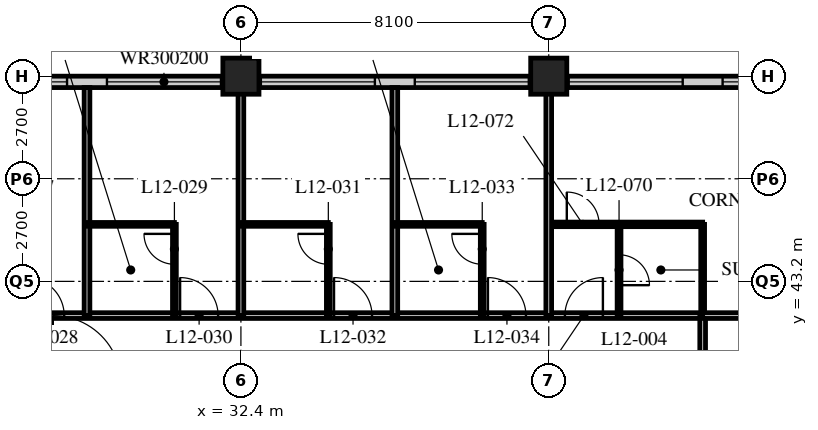
"""IFC4 building model, lengths in metres.
Left out: names, types, materials, properties, quantities, classifications, styles, units other than length and angle.
Written with IfcOpenShell. Run it as: python <this file> out.ifc"""

import sys

from ifc_helpers import new_model, si_unit, direction, frame, frame_2d, origin, origin_2d, place, context, subcontext, project, spatial, rectangle, hollow_rectangle, extrude, element, fill, save


model = new_model("IFC4")
c1 = context("Model", 3, precision=1e-05, world=origin(), true_north=direction((0.0, 1.0)))
c2 = subcontext(c1, "Body", "Model", "MODEL_VIEW")
j1 = project(units=[si_unit("LENGTHUNIT", "METRE"), si_unit("PLANEANGLEUNIT", "RADIAN")], contexts=[c1])
p1 = place(None, origin())
s1 = spatial("IfcSite", under=j1, at=p1, CompositionType="ELEMENT")
p2 = place(p1, origin())
s2 = spatial("IfcBuilding", under=s1, at=p2, CompositionType="ELEMENT")
p3 = place(p2, frame((0.0, 0.0, 53.4)))
s3 = spatial("IfcBuildingStorey", under=s2, at=p3, CompositionType="ELEMENT", Elevation=53.4)
for number, where, z_axis, x_axis in (
    (1, (32.4, 48.6, 0.0), (0.0, 0.0, 1.0), (1.0, 0.0, 0.0)),
    (2, (40.5, 48.6, 0.0), (0.0, 0.0, 1.0), (1.0, 0.0, 0.0)),
):
    element("IfcColumn", number, at=place(p3, frame(where, z_axis=z_axis, x_axis=x_axis)), inside=s3, PredefinedType="COLUMN", context=c2, shape_type="SweptSolid", body=[
        extrude(hollow_rectangle(XDim=0.95, YDim=0.95, WallThickness=0.095, at=origin_2d()), origin(), (0.0, 0.0, 1.0), 3.4),
    ])
p4 = place(p3, frame((48.3, 48.45, 0.0), z_axis=(0.0, 0.0, 1.0), x_axis=(-1.0, 0.0, 0.0)))
e3 = element("IfcWall", 3, at=p4, inside=s3, PredefinedType="SOLIDWALL", context=c2, shape_type="SweptSolid", body=[
    extrude(rectangle(XDim=40.2, YDim=0.3, at=frame_2d((20.1, 0.0))), origin(), (0.0, 0.0, 1.0), 3.19),
])
p5 = place(p4, frame((0.225, 0.0, 0.9)))
e4 = element("IfcOpeningElement", 4, at=p5, cuts=e3, PredefinedType="OPENING", context=c2, shape_type="SweptSolid", body=[
    extrude(rectangle(XDim=3.0, YDim=2.0, at=frame_2d((1.5, 1.0))), frame((0.0, 0.16, 0.0), z_axis=(0.0, -1.0, 0.0), x_axis=(1.0, 0.0, 0.0)), (0.0, 0.0, 1.0), 0.32),
])
p6 = place(p4, frame((4.275, 0.0, 0.9)))
e5 = element("IfcOpeningElement", 5, at=p6, cuts=e3, PredefinedType="OPENING", context=c2, shape_type="SweptSolid", body=[
    extrude(rectangle(XDim=3.0, YDim=2.0, at=frame_2d((1.5, 1.0))), frame((0.0, 0.16, 0.0), z_axis=(0.0, -1.0, 0.0), x_axis=(1.0, 0.0, 0.0)), (0.0, 0.0, 1.0), 0.32),
])
p7 = place(p4, frame((8.325, 0.0, 0.9)))
e6 = element("IfcOpeningElement", 6, at=p7, cuts=e3, PredefinedType="OPENING", context=c2, shape_type="SweptSolid", body=[
    extrude(rectangle(XDim=3.0, YDim=2.0, at=frame_2d((1.5, 1.0))), frame((0.0, 0.16, 0.0), z_axis=(0.0, -1.0, 0.0), x_axis=(1.0, 0.0, 0.0)), (0.0, 0.0, 1.0), 0.32),
])
p8 = place(p4, frame((12.375, 0.0, 0.9)))
e7 = element("IfcOpeningElement", 7, at=p8, cuts=e3, PredefinedType="OPENING", context=c2, shape_type="SweptSolid", body=[
    extrude(rectangle(XDim=3.0, YDim=2.0, at=frame_2d((1.5, 1.0))), frame((0.0, 0.16, 0.0), z_axis=(0.0, -1.0, 0.0), x_axis=(1.0, 0.0, 0.0)), (0.0, 0.0, 1.0), 0.32),
])
p9 = place(p4, frame((16.425, 0.0, 0.9)))
e8 = element("IfcOpeningElement", 8, at=p9, cuts=e3, PredefinedType="OPENING", context=c2, shape_type="SweptSolid", body=[
    extrude(rectangle(XDim=3.0, YDim=2.0, at=frame_2d((1.5, 1.0))), frame((0.0, 0.16, 0.0), z_axis=(0.0, -1.0, 0.0), x_axis=(1.0, 0.0, 0.0)), (0.0, 0.0, 1.0), 0.32),
])
p10 = place(p4, frame((20.475, 0.0, 0.9)))
e9 = element("IfcOpeningElement", 9, at=p10, cuts=e3, PredefinedType="OPENING", context=c2, shape_type="SweptSolid", body=[
    extrude(rectangle(XDim=3.0, YDim=2.0, at=frame_2d((1.5, 1.0))), frame((0.0, 0.16, 0.0), z_axis=(0.0, -1.0, 0.0), x_axis=(1.0, 0.0, 0.0)), (0.0, 0.0, 1.0), 0.32),
])
p11 = place(p4, frame((24.525, 0.0, 0.9)))
e10 = element("IfcOpeningElement", 10, at=p11, cuts=e3, PredefinedType="OPENING", context=c2, shape_type="SweptSolid", body=[
    extrude(rectangle(XDim=3.0, YDim=2.0, at=frame_2d((1.5, 1.0))), frame((0.0, 0.16, 0.0), z_axis=(0.0, -1.0, 0.0), x_axis=(1.0, 0.0, 0.0)), (0.0, 0.0, 1.0), 0.32),
])
p12 = place(p4, frame((28.575, 0.0, 0.9)))
e11 = element("IfcOpeningElement", 11, at=p12, cuts=e3, PredefinedType="OPENING", context=c2, shape_type="SweptSolid", body=[
    extrude(rectangle(XDim=3.0, YDim=2.0, at=frame_2d((1.5, 1.0))), frame((0.0, 0.16, 0.0), z_axis=(0.0, -1.0, 0.0), x_axis=(1.0, 0.0, 0.0)), (0.0, 0.0, 1.0), 0.32),
])
p13 = place(p4, frame((32.625, 0.0, 0.9)))
e12 = element("IfcOpeningElement", 12, at=p13, cuts=e3, PredefinedType="OPENING", context=c2, shape_type="SweptSolid", body=[
    extrude(rectangle(XDim=3.0, YDim=2.0, at=frame_2d((1.5, 1.0))), frame((0.0, 0.16, 0.0), z_axis=(0.0, -1.0, 0.0), x_axis=(1.0, 0.0, 0.0)), (0.0, 0.0, 1.0), 0.32),
])
p14 = place(p4, frame((36.675, 0.0, 0.9)))
e13 = element("IfcOpeningElement", 13, at=p14, cuts=e3, PredefinedType="OPENING", context=c2, shape_type="SweptSolid", body=[
    extrude(rectangle(XDim=3.0, YDim=2.0, at=frame_2d((1.5, 1.0))), frame((0.0, 0.16, 0.0), z_axis=(0.0, -1.0, 0.0), x_axis=(1.0, 0.0, 0.0)), (0.0, 0.0, 1.0), 0.32),
])
p15 = place(p3, frame((12.15, 42.3, 0.0), z_axis=(0.0, 0.0, 1.0), x_axis=(1.0, 0.0, 0.0)))
e14 = element("IfcWall", 14, at=p15, inside=s3, PredefinedType="PARTITIONING", context=c2, shape_type="SweptSolid", body=[
    extrude(rectangle(XDim=32.4, YDim=0.15, at=frame_2d((16.2, 0.0))), origin(), (0.0, 0.0, 1.0), 3.19),
])
p16 = place(p15, frame((6.5, 0.0, 0.0)))
e15 = element("IfcOpeningElement", 15, at=p16, cuts=e14, PredefinedType="OPENING", context=c2, shape_type="SweptSolid", body=[
    extrude(rectangle(XDim=1.0, YDim=2.1, at=frame_2d((0.5, 1.05))), frame((0.0, 0.085, 0.0), z_axis=(0.0, -1.0, 0.0), x_axis=(1.0, 0.0, 0.0)), (0.0, 0.0, 1.0), 0.17),
])
p17 = place(p15, frame((10.55, 0.0, 0.0)))
e16 = element("IfcOpeningElement", 16, at=p17, cuts=e14, PredefinedType="OPENING", context=c2, shape_type="SweptSolid", body=[
    extrude(rectangle(XDim=1.0, YDim=2.1, at=frame_2d((0.5, 1.05))), frame((0.0, 0.085, 0.0), z_axis=(0.0, -1.0, 0.0), x_axis=(1.0, 0.0, 0.0)), (0.0, 0.0, 1.0), 0.17),
])
p18 = place(p15, frame((14.6, 0.0, 0.0)))
e17 = element("IfcOpeningElement", 17, at=p18, cuts=e14, PredefinedType="OPENING", context=c2, shape_type="SweptSolid", body=[
    extrude(rectangle(XDim=1.0, YDim=2.1, at=frame_2d((0.5, 1.05))), frame((0.0, 0.085, 0.0), z_axis=(0.0, -1.0, 0.0), x_axis=(1.0, 0.0, 0.0)), (0.0, 0.0, 1.0), 0.17),
])
p19 = place(p15, frame((18.65, 0.0, 0.0)))
e18 = element("IfcOpeningElement", 18, at=p19, cuts=e14, PredefinedType="OPENING", context=c2, shape_type="SweptSolid", body=[
    extrude(rectangle(XDim=1.0, YDim=2.1, at=frame_2d((0.5, 1.05))), frame((0.0, 0.085, 0.0), z_axis=(0.0, -1.0, 0.0), x_axis=(1.0, 0.0, 0.0)), (0.0, 0.0, 1.0), 0.17),
])
p20 = place(p15, frame((22.7, 0.0, 0.0)))
e19 = element("IfcOpeningElement", 19, at=p20, cuts=e14, PredefinedType="OPENING", context=c2, shape_type="SweptSolid", body=[
    extrude(rectangle(XDim=1.0, YDim=2.1, at=frame_2d((0.5, 1.05))), frame((0.0, 0.085, 0.0), z_axis=(0.0, -1.0, 0.0), x_axis=(1.0, 0.0, 0.0)), (0.0, 0.0, 1.0), 0.17),
])
p21 = place(p15, frame((26.75, 0.0, 0.0)))
e20 = element("IfcOpeningElement", 20, at=p21, cuts=e14, PredefinedType="OPENING", context=c2, shape_type="SweptSolid", body=[
    extrude(rectangle(XDim=1.0, YDim=2.1, at=frame_2d((0.5, 1.05))), frame((0.0, 0.085, 0.0), z_axis=(0.0, -1.0, 0.0), x_axis=(1.0, 0.0, 0.0)), (0.0, 0.0, 1.0), 0.17),
])
p22 = place(p15, frame((28.775, 0.0, 0.0)))
e21 = element("IfcOpeningElement", 21, at=p22, cuts=e14, PredefinedType="OPENING", context=c2, shape_type="SweptSolid", body=[
    extrude(rectangle(XDim=1.0, YDim=2.1, at=frame_2d((0.5, 1.05))), frame((0.0, 0.085, 0.0), z_axis=(0.0, -1.0, 0.0), x_axis=(1.0, 0.0, 0.0)), (0.0, 0.0, 1.0), 0.17),
])
p23 = place(p15, frame((2.625, 0.0, 0.0)))
e22 = element("IfcOpeningElement", 22, at=p23, cuts=e14, PredefinedType="OPENING", context=c2, shape_type="SweptSolid", body=[
    extrude(rectangle(XDim=1.0, YDim=2.1, at=frame_2d((0.5, 1.05))), frame((0.0, 0.085, 0.0), z_axis=(0.0, -1.0, 0.0), x_axis=(1.0, 0.0, 0.0)), (0.0, 0.0, 1.0), 0.17),
])
p24 = place(p3, frame((44.55, 12.15, 0.0), z_axis=(0.0, 0.0, 1.0), x_axis=(0.0, 1.0, 0.0)))
e23 = element("IfcWall", 23, at=p24, inside=s3, PredefinedType="PARTITIONING", context=c2, shape_type="SweptSolid", body=[
    extrude(rectangle(XDim=30.15, YDim=0.15, at=frame_2d((15.075, 0.0))), origin(), (0.0, 0.0, 1.0), 3.19),
])
p25 = place(p24, frame((2.75, 0.0, 0.0)))
e24 = element("IfcOpeningElement", 24, at=p25, cuts=e23, PredefinedType="OPENING", context=c2, shape_type="SweptSolid", body=[
    extrude(rectangle(XDim=1.0, YDim=2.1, at=frame_2d((0.5, 1.05))), frame((0.0, 0.085, 0.0), z_axis=(0.0, -1.0, 0.0), x_axis=(1.0, 0.0, 0.0)), (0.0, 0.0, 1.0), 0.17),
])
p26 = place(p24, frame((6.5, 0.0, 0.0)))
e25 = element("IfcOpeningElement", 25, at=p26, cuts=e23, PredefinedType="OPENING", context=c2, shape_type="SweptSolid", body=[
    extrude(rectangle(XDim=1.0, YDim=2.1, at=frame_2d((0.5, 1.05))), frame((0.0, 0.085, 0.0), z_axis=(0.0, -1.0, 0.0), x_axis=(1.0, 0.0, 0.0)), (0.0, 0.0, 1.0), 0.17),
])
p27 = place(p24, frame((10.55, 0.0, 0.0)))
e26 = element("IfcOpeningElement", 26, at=p27, cuts=e23, PredefinedType="OPENING", context=c2, shape_type="SweptSolid", body=[
    extrude(rectangle(XDim=1.0, YDim=2.1, at=frame_2d((0.5, 1.05))), frame((0.0, 0.085, 0.0), z_axis=(0.0, -1.0, 0.0), x_axis=(1.0, 0.0, 0.0)), (0.0, 0.0, 1.0), 0.17),
])
p28 = place(p24, frame((14.6, 0.0, 0.0)))
e27 = element("IfcOpeningElement", 27, at=p28, cuts=e23, PredefinedType="OPENING", context=c2, shape_type="SweptSolid", body=[
    extrude(rectangle(XDim=1.0, YDim=2.1, at=frame_2d((0.5, 1.05))), frame((0.0, 0.085, 0.0), z_axis=(0.0, -1.0, 0.0), x_axis=(1.0, 0.0, 0.0)), (0.0, 0.0, 1.0), 0.17),
])
p29 = place(p24, frame((18.65, 0.0, 0.0)))
e28 = element("IfcOpeningElement", 28, at=p29, cuts=e23, PredefinedType="OPENING", context=c2, shape_type="SweptSolid", body=[
    extrude(rectangle(XDim=1.0, YDim=2.1, at=frame_2d((0.5, 1.05))), frame((0.0, 0.085, 0.0), z_axis=(0.0, -1.0, 0.0), x_axis=(1.0, 0.0, 0.0)), (0.0, 0.0, 1.0), 0.17),
])
p30 = place(p24, frame((22.7, 0.0, 0.0)))
e29 = element("IfcOpeningElement", 29, at=p30, cuts=e23, PredefinedType="OPENING", context=c2, shape_type="SweptSolid", body=[
    extrude(rectangle(XDim=1.0, YDim=2.1, at=frame_2d((0.5, 1.05))), frame((0.0, 0.085, 0.0), z_axis=(0.0, -1.0, 0.0), x_axis=(1.0, 0.0, 0.0)), (0.0, 0.0, 1.0), 0.17),
])
p31 = place(p24, frame((26.7, 0.0, 0.0)))
e30 = element("IfcOpeningElement", 30, at=p31, cuts=e23, PredefinedType="OPENING", context=c2, shape_type="SweptSolid", body=[
    extrude(rectangle(XDim=1.0, YDim=2.1, at=frame_2d((0.5, 1.05))), frame((0.0, 0.085, 0.0), z_axis=(0.0, -1.0, 0.0), x_axis=(1.0, 0.0, 0.0)), (0.0, 0.0, 1.0), 0.17),
])
p32 = place(p3, frame((28.35, 42.3, 0.0), z_axis=(0.0, 0.0, 1.0), x_axis=(0.0, 1.0, 0.0)))
e31 = element("IfcWall", 31, at=p32, inside=s3, PredefinedType="PARTITIONING", context=c2, shape_type="SweptSolid", body=[
    extrude(rectangle(XDim=6.0, YDim=0.15, at=frame_2d((3.0, 0.0))), origin(), (0.0, 0.0, 1.0), 3.19),
])
p33 = place(p3, frame((28.35, 44.7, 0.0), z_axis=(0.0, 0.0, 1.0), x_axis=(1.0, 0.0, 0.0)))
e32 = element("IfcWall", 32, at=p33, inside=s3, PredefinedType="PARTITIONING", context=c2, shape_type="SweptSolid", body=[
    extrude(rectangle(XDim=2.3, YDim=0.1, at=frame_2d((1.15, 0.0))), origin(), (0.0, 0.0, 1.0), 3.19),
])
p34 = place(p3, frame((30.65, 42.3, 0.0), z_axis=(0.0, 0.0, 1.0), x_axis=(0.0, 1.0, 0.0)))
e33 = element("IfcWall", 33, at=p34, inside=s3, PredefinedType="PARTITIONING", context=c2, shape_type="SweptSolid", body=[
    extrude(rectangle(XDim=2.4, YDim=0.1, at=frame_2d((1.2, 0.0))), origin(), (0.0, 0.0, 1.0), 3.19),
])
p35 = place(p34, frame((1.35, 0.0, 0.0)))
e34 = element("IfcOpeningElement", 34, at=p35, cuts=e33, PredefinedType="OPENING", context=c2, shape_type="SweptSolid", body=[
    extrude(rectangle(XDim=0.8, YDim=2.1, at=frame_2d((0.4, 1.05))), frame((0.0, 0.06, 0.0), z_axis=(0.0, -1.0, 0.0), x_axis=(1.0, 0.0, 0.0)), (0.0, 0.0, 1.0), 0.12),
])
p36 = place(p3, frame((32.4, 42.3, 0.0), z_axis=(0.0, 0.0, 1.0), x_axis=(0.0, 1.0, 0.0)))
e35 = element("IfcWall", 35, at=p36, inside=s3, PredefinedType="PARTITIONING", context=c2, shape_type="SweptSolid", body=[
    extrude(rectangle(XDim=6.0, YDim=0.15, at=frame_2d((3.0, 0.0))), origin(), (0.0, 0.0, 1.0), 2.578),
])
p37 = place(p3, frame((32.4, 44.7, 0.0), z_axis=(0.0, 0.0, 1.0), x_axis=(1.0, 0.0, 0.0)))
e36 = element("IfcWall", 36, at=p37, inside=s3, PredefinedType="PARTITIONING", context=c2, shape_type="SweptSolid", body=[
    extrude(rectangle(XDim=2.3, YDim=0.1, at=frame_2d((1.15, 0.0))), origin(), (0.0, 0.0, 1.0), 3.19),
])
p38 = place(p3, frame((34.7, 42.3, 0.0), z_axis=(0.0, 0.0, 1.0), x_axis=(0.0, 1.0, 0.0)))
e37 = element("IfcWall", 37, at=p38, inside=s3, PredefinedType="PARTITIONING", context=c2, shape_type="SweptSolid", body=[
    extrude(rectangle(XDim=2.4, YDim=0.1, at=frame_2d((1.2, 0.0))), origin(), (0.0, 0.0, 1.0), 3.19),
])
p39 = place(p38, frame((1.35, 0.0, 0.0)))
e38 = element("IfcOpeningElement", 38, at=p39, cuts=e37, PredefinedType="OPENING", context=c2, shape_type="SweptSolid", body=[
    extrude(rectangle(XDim=0.8, YDim=2.1, at=frame_2d((0.4, 1.05))), frame((0.0, 0.06, 0.0), z_axis=(0.0, -1.0, 0.0), x_axis=(1.0, 0.0, 0.0)), (0.0, 0.0, 1.0), 0.12),
])
p40 = place(p3, frame((36.45, 42.3, 0.0), z_axis=(0.0, 0.0, 1.0), x_axis=(0.0, 1.0, 0.0)))
e39 = element("IfcWall", 39, at=p40, inside=s3, PredefinedType="PARTITIONING", context=c2, shape_type="SweptSolid", body=[
    extrude(rectangle(XDim=6.0, YDim=0.15, at=frame_2d((3.0, 0.0))), origin(), (0.0, 0.0, 1.0), 3.19),
])
p41 = place(p3, frame((36.45, 44.7, 0.0), z_axis=(0.0, 0.0, 1.0), x_axis=(1.0, 0.0, 0.0)))
e40 = element("IfcWall", 40, at=p41, inside=s3, PredefinedType="PARTITIONING", context=c2, shape_type="SweptSolid", body=[
    extrude(rectangle(XDim=2.3, YDim=0.1, at=frame_2d((1.15, 0.0))), origin(), (0.0, 0.0, 1.0), 3.19),
])
p42 = place(p3, frame((38.75, 42.3, 0.0), z_axis=(0.0, 0.0, 1.0), x_axis=(0.0, 1.0, 0.0)))
e41 = element("IfcWall", 41, at=p42, inside=s3, PredefinedType="PARTITIONING", context=c2, shape_type="SweptSolid", body=[
    extrude(rectangle(XDim=2.4, YDim=0.1, at=frame_2d((1.2, 0.0))), origin(), (0.0, 0.0, 1.0), 3.19),
])
p43 = place(p42, frame((1.35, 0.0, 0.0)))
e42 = element("IfcOpeningElement", 42, at=p43, cuts=e41, PredefinedType="OPENING", context=c2, shape_type="SweptSolid", body=[
    extrude(rectangle(XDim=0.8, YDim=2.1, at=frame_2d((0.4, 1.05))), frame((0.0, 0.06, 0.0), z_axis=(0.0, -1.0, 0.0), x_axis=(1.0, 0.0, 0.0)), (0.0, 0.0, 1.0), 0.12),
])
p44 = place(p3, frame((40.5, 44.7, 0.0), z_axis=(0.0, 0.0, 1.0), x_axis=(1.0, 0.0, 0.0)))
e43 = element("IfcWall", 43, at=p44, inside=s3, PredefinedType="PARTITIONING", context=c2, shape_type="SweptSolid", body=[
    extrude(rectangle(XDim=4.05, YDim=0.12, at=frame_2d((2.025, 0.0))), origin(), (0.0, 0.0, 1.0), 3.19),
])
p45 = place(p44, frame((0.475, 0.0, 0.0)))
e44 = element("IfcOpeningElement", 44, at=p45, cuts=e43, PredefinedType="OPENING", context=c2, shape_type="SweptSolid", body=[
    extrude(rectangle(XDim=0.85, YDim=2.1, at=frame_2d((0.425, 1.05))), frame((0.0, 0.07, 0.0), z_axis=(0.0, -1.0, 0.0), x_axis=(1.0, 0.0, 0.0)), (0.0, 0.0, 1.0), 0.14),
])
p46 = place(p3, frame((42.35, 42.3, 0.0), z_axis=(0.0, 0.0, 1.0), x_axis=(0.0, 1.0, 0.0)))
e45 = element("IfcWall", 45, at=p46, inside=s3, PredefinedType="PARTITIONING", context=c2, shape_type="SweptSolid", body=[
    extrude(rectangle(XDim=2.4, YDim=0.1, at=frame_2d((1.2, 0.0))), origin(), (0.0, 0.0, 1.0), 3.19),
])
p47 = place(p46, frame((0.8, 0.0, 0.0)))
e46 = element("IfcOpeningElement", 46, at=p47, cuts=e45, PredefinedType="OPENING", context=c2, shape_type="SweptSolid", body=[
    extrude(rectangle(XDim=0.8, YDim=2.1, at=frame_2d((0.4, 1.05))), frame((0.0, 0.06, 0.0), z_axis=(0.0, -1.0, 0.0), x_axis=(1.0, 0.0, 0.0)), (0.0, 0.0, 1.0), 0.12),
])
p48 = place(p3, frame((44.55, 42.3, 0.0), z_axis=(0.0, 0.0, 1.0), x_axis=(0.0, 1.0, 0.0)))
e47 = element("IfcWall", 47, at=p48, inside=s3, PredefinedType="PARTITIONING", context=c2, shape_type="SweptSolid", body=[
    extrude(rectangle(XDim=2.4, YDim=0.1, at=frame_2d((1.2, 0.0))), origin(), (0.0, 0.0, 1.0), 3.19),
])
p49 = place(p3, frame((44.55, 42.3, 0.0), z_axis=(0.0, 0.0, 1.0), x_axis=(1.0, 0.0, 0.0)))
e48 = element("IfcWall", 48, at=p49, inside=s3, PredefinedType="PARTITIONING", context=c2, shape_type="SweptSolid", body=[
    extrude(rectangle(XDim=7.8, YDim=0.15, at=frame_2d((3.9, 0.0))), origin(), (0.0, 0.0, 1.0), 3.19),
])
p50 = place(p3, frame((40.5, 42.3, 0.0), z_axis=(0.0, 0.0, 1.0), x_axis=(0.0, 1.0, 0.0)))
e49 = element("IfcWall", 49, at=p50, inside=s3, PredefinedType="PARTITIONING", context=c2, shape_type="SweptSolid", body=[
    extrude(rectangle(XDim=6.0, YDim=0.15, at=frame_2d((3.0, 0.0))), origin(), (0.0, 0.0, 1.0), 2.578),
])
p51 = place(p5, origin())
e50 = element("IfcWindow", 50, at=p51, inside=s3, PartitioningType="SINGLE_PANEL", PredefinedType="WINDOW", context=c2, shape_type="SweptSolid", body=[
    extrude(rectangle(XDim=3.0, YDim=2.0, at=frame_2d((1.5, 1.0))), frame((0.0, 0.03, 0.0), z_axis=(0.0, -1.0, 0.0), x_axis=(1.0, 0.0, 0.0)), (0.0, 0.0, 1.0), 0.06),
])
fill(e4, e50)
p52 = place(p6, origin())
e51 = element("IfcWindow", 51, at=p52, inside=s3, PartitioningType="SINGLE_PANEL", PredefinedType="WINDOW", context=c2, shape_type="SweptSolid", body=[
    extrude(rectangle(XDim=3.0, YDim=2.0, at=frame_2d((1.5, 1.0))), frame((0.0, 0.03, 0.0), z_axis=(0.0, -1.0, 0.0), x_axis=(1.0, 0.0, 0.0)), (0.0, 0.0, 1.0), 0.06),
])
fill(e5, e51)
p53 = place(p7, origin())
e52 = element("IfcWindow", 52, at=p53, inside=s3, PartitioningType="SINGLE_PANEL", PredefinedType="WINDOW", context=c2, shape_type="SweptSolid", body=[
    extrude(rectangle(XDim=3.0, YDim=2.0, at=frame_2d((1.5, 1.0))), frame((0.0, 0.03, 0.0), z_axis=(0.0, -1.0, 0.0), x_axis=(1.0, 0.0, 0.0)), (0.0, 0.0, 1.0), 0.06),
])
fill(e6, e52)
p54 = place(p8, origin())
e53 = element("IfcWindow", 53, at=p54, inside=s3, PartitioningType="SINGLE_PANEL", PredefinedType="WINDOW", context=c2, shape_type="SweptSolid", body=[
    extrude(rectangle(XDim=3.0, YDim=2.0, at=frame_2d((1.5, 1.0))), frame((0.0, 0.03, 0.0), z_axis=(0.0, -1.0, 0.0), x_axis=(1.0, 0.0, 0.0)), (0.0, 0.0, 1.0), 0.06),
])
fill(e7, e53)
p55 = place(p9, origin())
e54 = element("IfcWindow", 54, at=p55, inside=s3, PartitioningType="SINGLE_PANEL", PredefinedType="WINDOW", context=c2, shape_type="SweptSolid", body=[
    extrude(rectangle(XDim=3.0, YDim=2.0, at=frame_2d((1.5, 1.0))), frame((0.0, 0.03, 0.0), z_axis=(0.0, -1.0, 0.0), x_axis=(1.0, 0.0, 0.0)), (0.0, 0.0, 1.0), 0.06),
])
fill(e8, e54)
p56 = place(p10, origin())
e55 = element("IfcWindow", 55, at=p56, inside=s3, PartitioningType="SINGLE_PANEL", PredefinedType="WINDOW", context=c2, shape_type="SweptSolid", body=[
    extrude(rectangle(XDim=3.0, YDim=2.0, at=frame_2d((1.5, 1.0))), frame((0.0, 0.03, 0.0), z_axis=(0.0, -1.0, 0.0), x_axis=(1.0, 0.0, 0.0)), (0.0, 0.0, 1.0), 0.06),
])
fill(e9, e55)
p57 = place(p18, origin())
e56 = element("IfcDoor", 56, at=p57, inside=s3, OperationType="SINGLE_SWING_LEFT", PredefinedType="DOOR", context=c2, shape_type="SweptSolid", body=[
    extrude(rectangle(XDim=1.0, YDim=2.1, at=frame_2d((0.5, 1.05))), frame((0.0, 0.025, 0.0), z_axis=(0.0, -1.0, 0.0), x_axis=(1.0, 0.0, 0.0)), (0.0, 0.0, 1.0), 0.05),
])
fill(e17, e56)
p58 = place(p35, origin())
e57 = element("IfcDoor", 57, at=p58, inside=s3, OperationType="SINGLE_SWING_RIGHT", PredefinedType="DOOR", context=c2, shape_type="SweptSolid", body=[
    extrude(rectangle(XDim=0.8, YDim=2.1, at=frame_2d((0.4, 1.05))), frame((0.0, 0.025, 0.0), z_axis=(0.0, -1.0, 0.0), x_axis=(1.0, 0.0, 0.0)), (0.0, 0.0, 1.0), 0.05),
])
fill(e34, e57)
p59 = place(p19, origin())
e58 = element("IfcDoor", 58, at=p59, inside=s3, OperationType="SINGLE_SWING_LEFT", PredefinedType="DOOR", context=c2, shape_type="SweptSolid", body=[
    extrude(rectangle(XDim=1.0, YDim=2.1, at=frame_2d((0.5, 1.05))), frame((0.0, 0.025, 0.0), z_axis=(0.0, -1.0, 0.0), x_axis=(1.0, 0.0, 0.0)), (0.0, 0.0, 1.0), 0.05),
])
fill(e18, e58)
p60 = place(p39, origin())
e59 = element("IfcDoor", 59, at=p60, inside=s3, OperationType="SINGLE_SWING_RIGHT", PredefinedType="DOOR", context=c2, shape_type="SweptSolid", body=[
    extrude(rectangle(XDim=0.8, YDim=2.1, at=frame_2d((0.4, 1.05))), frame((0.0, 0.025, 0.0), z_axis=(0.0, -1.0, 0.0), x_axis=(1.0, 0.0, 0.0)), (0.0, 0.0, 1.0), 0.05),
])
fill(e38, e59)
p61 = place(p20, origin())
e60 = element("IfcDoor", 60, at=p61, inside=s3, OperationType="SINGLE_SWING_LEFT", PredefinedType="DOOR", context=c2, shape_type="SweptSolid", body=[
    extrude(rectangle(XDim=1.0, YDim=2.1, at=frame_2d((0.5, 1.05))), frame((0.0, 0.025, 0.0), z_axis=(0.0, -1.0, 0.0), x_axis=(1.0, 0.0, 0.0)), (0.0, 0.0, 1.0), 0.05),
])
fill(e19, e60)
p62 = place(p43, origin())
e61 = element("IfcDoor", 61, at=p62, inside=s3, OperationType="SINGLE_SWING_RIGHT", PredefinedType="DOOR", context=c2, shape_type="SweptSolid", body=[
    extrude(rectangle(XDim=0.8, YDim=2.1, at=frame_2d((0.4, 1.05))), frame((0.0, 0.025, 0.0), z_axis=(0.0, -1.0, 0.0), x_axis=(1.0, 0.0, 0.0)), (0.0, 0.0, 1.0), 0.05),
])
fill(e42, e61)
p63 = place(p21, origin())
e62 = element("IfcDoor", 62, at=p63, inside=s3, OperationType="SINGLE_SWING_LEFT", PredefinedType="DOOR", context=c2, shape_type="SweptSolid", body=[
    extrude(rectangle(XDim=1.0, YDim=2.1, at=frame_2d((0.5, 1.05))), frame((0.0, 0.025, 0.0), z_axis=(0.0, -1.0, 0.0), x_axis=(1.0, 0.0, 0.0)), (0.0, 0.0, 1.0), 0.05),
])
fill(e20, e62)
p64 = place(p47, origin())
e63 = element("IfcDoor", 63, at=p64, inside=s3, OperationType="SINGLE_SWING_RIGHT", PredefinedType="DOOR", context=c2, shape_type="SweptSolid", body=[
    extrude(rectangle(XDim=0.8, YDim=2.1, at=frame_2d((0.4, 1.05))), frame((0.0, 0.025, 0.0), z_axis=(0.0, -1.0, 0.0), x_axis=(1.0, 0.0, 0.0)), (0.0, 0.0, 1.0), 0.05),
])
fill(e46, e63)
p65 = place(p22, origin())
e64 = element("IfcDoor", 64, at=p65, inside=s3, OperationType="SINGLE_SWING_RIGHT", PredefinedType="DOOR", context=c2, shape_type="SweptSolid", body=[
    extrude(rectangle(XDim=1.0, YDim=2.1, at=frame_2d((0.5, 1.05))), frame((0.0, 0.025, 0.0), z_axis=(0.0, -1.0, 0.0), x_axis=(1.0, 0.0, 0.0)), (0.0, 0.0, 1.0), 0.05),
])
fill(e21, e64)
p66 = place(p45, origin())
e65 = element("IfcDoor", 65, at=p66, inside=s3, OperationType="SINGLE_SWING_LEFT", PredefinedType="DOOR", context=c2, shape_type="SweptSolid", body=[
    extrude(rectangle(XDim=0.85, YDim=2.1, at=frame_2d((0.425, 1.05))), frame((0.0, 0.025, 0.0), z_axis=(0.0, -1.0, 0.0), x_axis=(1.0, 0.0, 0.0)), (0.0, 0.0, 1.0), 0.05),
])
fill(e44, e65)
save(model, sys.argv[1])
